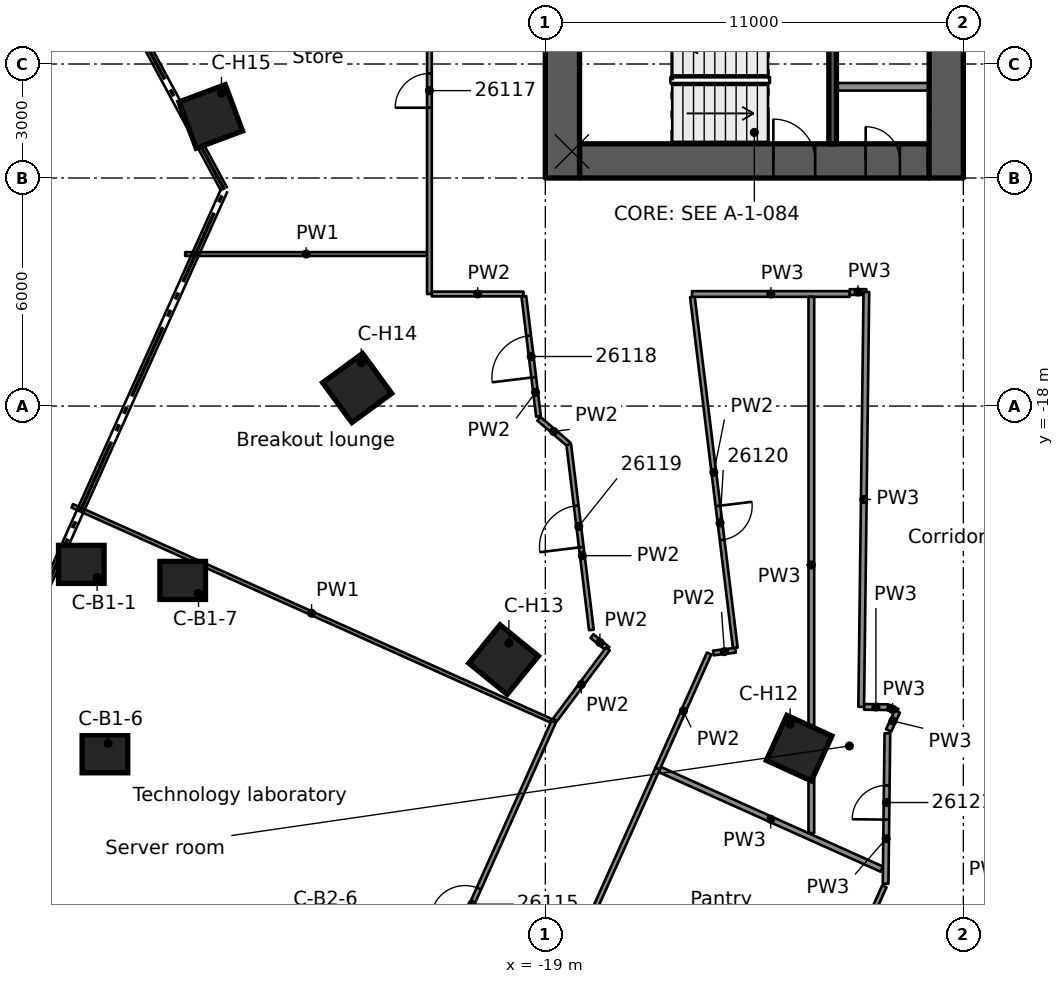
"""IFC4 building model, lengths in metres.
Left out: names, types, materials, properties, quantities, classifications, styles, units other than length and angle.
Written with IfcOpenShell. Run it as: python <this file> out.ifc"""

import sys

from ifc_helpers import new_model, si_unit, direction, frame, frame_2d, origin, origin_2d, place, context, subcontext, project, spatial, rectangle, extrude, element, fill, save


model = new_model("IFC4")
c1 = context("Model", 3, precision=1e-05, world=origin(), true_north=direction((0.0, 1.0)))
c2 = subcontext(c1, "Body", "Model", "MODEL_VIEW")
j1 = project(units=[si_unit("LENGTHUNIT", "METRE"), si_unit("PLANEANGLEUNIT", "RADIAN")], contexts=[c1])
p1 = place(None, origin())
s1 = spatial("IfcSite", under=j1, at=p1, CompositionType="ELEMENT")
p2 = place(p1, origin())
s2 = spatial("IfcBuilding", under=s1, at=p2, CompositionType="ELEMENT")
p3 = place(p2, frame((0.0, 0.0, 134.2)))
s3 = spatial("IfcBuildingStorey", under=s2, at=p3, CompositionType="ELEMENT", Elevation=134.2)
p4 = place(p3, frame((-18.1, -11.55, 0.0), z_axis=(0.0, 0.0, 1.0), x_axis=(1.0, 0.0, 0.0)))
e1 = element("IfcWall", 1, at=p4, inside=s3, PredefinedType="SHEAR", context=c2, shape_type="SweptSolid", body=[
    extrude(rectangle(XDim=9.2, YDim=0.9, at=frame_2d((4.6, 0.0))), origin(), (0.0, 0.0, 1.0), 3.5),
])
p5 = place(p4, frame((5.1, 0.0, 0.0)))
e2 = element("IfcOpeningElement", 2, at=p5, cuts=e1, PredefinedType="OPENING", context=c2, shape_type="SweptSolid", body=[
    extrude(rectangle(XDim=1.1, YDim=2.1, at=frame_2d((0.55, 1.05))), frame((0.0, 0.46, 0.0), z_axis=(0.0, -1.0, 0.0), x_axis=(1.0, 0.0, 0.0)), (0.0, 0.0, 1.0), 0.92),
])
p6 = place(p4, frame((7.53, 0.0, 0.0)))
e3 = element("IfcOpeningElement", 3, at=p6, cuts=e1, PredefinedType="OPENING", context=c2, shape_type="SweptSolid", body=[
    extrude(rectangle(XDim=0.9, YDim=2.1, at=frame_2d((0.45, 1.05))), frame((0.0, 0.46, 0.0), z_axis=(0.0, -1.0, 0.0), x_axis=(1.0, 0.0, 0.0)), (0.0, 0.0, 1.0), 0.92),
])
p7 = place(p3, frame((-18.55, -12.0, 0.0), z_axis=(0.0, 0.0, 1.0), x_axis=(0.0, 1.0, 0.0)))
e4 = element("IfcWall", 4, at=p7, inside=s3, PredefinedType="SHEAR", context=c2, shape_type="SweptSolid", body=[
    extrude(rectangle(XDim=24.0, YDim=0.9, at=frame_2d((12.0, 0.0))), origin(), (0.0, 0.0, 1.0), 3.5),
])
p8 = place(p7, frame((10.1, 0.0, 0.0)))
e5 = element("IfcOpeningElement", 5, at=p8, cuts=e4, PredefinedType="OPENING", context=c2, shape_type="SweptSolid", body=[
    extrude(rectangle(XDim=1.8, YDim=2.1, at=frame_2d((0.9, 1.05))), frame((0.0, 0.46, 0.0), z_axis=(0.0, -1.0, 0.0), x_axis=(1.0, 0.0, 0.0)), (0.0, 0.0, 1.0), 0.92),
])
p9 = place(p3, frame((-8.45, -12.0, 0.0), z_axis=(0.0, 0.0, 1.0), x_axis=(0.0, 1.0, 0.0)))
e6 = element("IfcWall", 6, at=p9, inside=s3, PredefinedType="SHEAR", context=c2, shape_type="SweptSolid", body=[
    extrude(rectangle(XDim=24.0, YDim=0.9, at=frame_2d((12.0, 0.0))), origin(), (0.0, 0.0, 1.0), 3.5),
])
p10 = place(p9, frame((9.6, 0.0, 0.0)))
e7 = element("IfcOpeningElement", 7, at=p10, cuts=e6, PredefinedType="OPENING", context=c2, shape_type="SweptSolid", body=[
    extrude(rectangle(XDim=1.8, YDim=2.1, at=frame_2d((0.9, 1.05))), frame((0.0, 0.46, 0.0), z_axis=(0.0, -1.0, 0.0), x_axis=(1.0, 0.0, 0.0)), (0.0, 0.0, 1.0), 0.92),
])
p11 = place(p9, frame((19.65, 0.0, 0.0)))
e8 = element("IfcOpeningElement", 8, at=p11, cuts=e6, PredefinedType="OPENING", context=c2, shape_type="SweptSolid", body=[
    extrude(rectangle(XDim=1.1, YDim=2.1, at=frame_2d((0.55, 1.05))), frame((0.0, 0.46, 0.0), z_axis=(0.0, -1.0, 0.0), x_axis=(1.0, 0.0, 0.0)), (0.0, 0.0, 1.0), 0.92),
])
for number, where, z_axis, x_axis in (
    (9, (-31.21, -22.166, 0.0), (0.0, 0.0, 1.0), (1.0, 0.0, 0.0)),
    (10, (-30.589, -27.15, 0.0), (0.0, 0.0, 1.0), (1.0, 0.0, 0.0)),
    (11, (-28.542, -22.588, 0.0), (0.0, 0.0, 1.0), (1.0, 0.0, 0.0)),
):
    element("IfcColumn", number, at=place(p3, frame(where, z_axis=z_axis, x_axis=x_axis)), inside=s3, PredefinedType="COLUMN", context=c2, shape_type="SweptSolid", body=[
        extrude(rectangle(XDim=1.2, YDim=1.0, at=origin_2d()), origin(), (0.0, 0.0, 1.0), 3.5),
    ])
for number, where, z_axis, x_axis in (
    (12, (-12.321, -27.001, 0.0), (0.0, 0.0, 1.0), (-0.415, -0.91, 0.0)),
    (13, (-20.098, -24.672, 0.0), (0.0, 0.0, 1.0), (-0.632, -0.775, 0.0)),
    (14, (-23.951, -17.526, 0.0), (0.0, 0.0, 1.0), (-0.807, -0.591, 0.0)),
    (15, (-27.804, -10.38, 0.0), (0.0, 0.0, 1.0), (-0.937, -0.35, 0.0)),
):
    element("IfcColumn", number, at=place(p3, frame(where, z_axis=z_axis, x_axis=x_axis)), inside=s3, PredefinedType="COLUMN", context=c2, shape_type="SweptSolid", body=[
        extrude(rectangle(XDim=1.3, YDim=1.3, at=origin_2d()), origin(), (0.0, 0.0, 1.0), 3.5),
    ])
p12 = place(p3, frame((-11.44, -11.1, 0.0), z_axis=(0.0, 0.0, 1.0), x_axis=(0.0, 1.0, 0.0)))
e16 = element("IfcWall", 16, at=p12, inside=s3, PredefinedType="SOLIDWALL", context=c2, shape_type="SweptSolid", body=[
    extrude(rectangle(XDim=4.125, YDim=0.2, at=frame_2d((2.062, 0.0))), origin(), (0.0, 0.0, 1.0), 3.09),
])
p13 = place(p3, frame((-8.9, -9.6, 0.0), z_axis=(0.0, 0.0, 1.0), x_axis=(-1.0, 0.0, 0.0)))
e17 = element("IfcWall", 17, at=p13, inside=s3, PredefinedType="PARTITIONING", context=c2, shape_type="SweptSolid", body=[
    extrude(rectangle(XDim=2.44, YDim=0.2, at=frame_2d((1.22, 0.0))), origin(), (0.0, 0.0, 1.0), 3.09),
])
p14 = place(p3, frame((-19.18, -18.272, 0.0), z_axis=(0.0, 0.0, 1.0), x_axis=(-0.120984312483, 0.992654419289, 0.0)))
e18 = element("IfcWall", 18, at=p14, inside=s3, PredefinedType="PARTITIONING", context=c2, shape_type="SweptSolid", body=[
    extrude(rectangle(XDim=3.182, YDim=0.125, at=frame_2d((1.591, 0.0))), origin(), (0.0, 0.0, 1.0), 3.03),
])
p15 = place(p14, frame((1.038, 0.0, 0.0)))
e19 = element("IfcOpeningElement", 19, at=p15, cuts=e18, PredefinedType="OPENING", context=c2, shape_type="SweptSolid", body=[
    extrude(rectangle(XDim=1.1, YDim=2.1, at=frame_2d((0.55, 1.05))), frame((0.0, 0.073, 0.0), z_axis=(0.0, -1.0, 0.0), x_axis=(1.0, 0.0, 0.0)), (0.0, 0.0, 1.0), 0.145),
])
p16 = place(p3, frame((-17.788, -23.891, 0.0), z_axis=(0.0, 0.0, 1.0), x_axis=(-0.121262962016, 0.992620417906, 0.0)))
e20 = element("IfcWall", 20, at=p16, inside=s3, PredefinedType="PARTITIONING", context=c2, shape_type="SweptSolid", body=[
    extrude(rectangle(XDim=4.923, YDim=0.125, at=frame_2d((2.461, 0.0))), origin(), (0.0, 0.0, 1.0), 3.03),
])
p17 = place(p16, frame((2.195, 0.0, 0.0)))
e21 = element("IfcOpeningElement", 21, at=p17, cuts=e20, PredefinedType="OPENING", context=c2, shape_type="SweptSolid", body=[
    extrude(rectangle(XDim=1.1, YDim=2.1, at=frame_2d((0.55, 1.05))), frame((0.0, 0.073, 0.0), z_axis=(0.0, -1.0, 0.0), x_axis=(1.0, 0.0, 0.0)), (0.0, 0.0, 1.0), 0.145),
])
p18 = place(p3, frame((-15.13, -15.125, 0.0), z_axis=(0.0, 0.0, 1.0), x_axis=(0.121299614281, -0.992615939614, 0.0)))
e22 = element("IfcWall", 22, at=p18, inside=s3, PredefinedType="PARTITIONING", context=c2, shape_type="SweptSolid", body=[
    extrude(rectangle(XDim=9.307, YDim=0.125, at=frame_2d((4.653, 0.0))), origin(), (0.0, 0.0, 1.0), 3.03),
])
p19 = place(p18, frame((5.544, 0.0, 0.0)))
e23 = element("IfcOpeningElement", 23, at=p19, cuts=e22, PredefinedType="OPENING", context=c2, shape_type="SweptSolid", body=[
    extrude(rectangle(XDim=0.9, YDim=2.1, at=frame_2d((0.45, 1.05))), frame((0.0, 0.073, 0.0), z_axis=(0.0, -1.0, 0.0), x_axis=(1.0, 0.0, 0.0)), (0.0, 0.0, 1.0), 0.145),
])
p20 = place(p3, frame((-17.772, -24.052, 0.0), z_axis=(0.0, 0.0, 1.0), x_axis=(0.774946890669, -0.632026357554, 0.0)))
e24 = element("IfcWall", 24, at=p20, inside=s3, PredefinedType="PARTITIONING", context=c2, shape_type="SweptSolid", body=[
    extrude(rectangle(XDim=0.538, YDim=0.125, at=frame_2d((0.269, 0.0))), origin(), (0.0, 0.0, 1.0), 3.03),
])
p21 = place(p3, frame((-9.988, -25.923, 0.0), z_axis=(0.0, 0.0, 1.0), x_axis=(0.909848474823, -0.414940661858, 0.0)))
e25 = element("IfcWall", 25, at=p21, inside=s3, PredefinedType="PARTITIONING", context=c2, shape_type="SweptSolid", body=[
    extrude(rectangle(XDim=0.275, YDim=0.15, at=frame_2d((0.137, 0.0))), origin(), (0.0, 0.0, 1.0), 3.03),
])
p22 = place(p3, frame((-35.67, -30.029, 0.0), z_axis=(0.0, 0.0, 1.0), x_axis=(0.912388382828, -0.409325590307, 0.0)))
e26 = element("IfcWall", 26, at=p22, inside=s3, PredefinedType="PARTITIONING", context=c2, shape_type="SweptSolid", body=[
    extrude(rectangle(XDim=13.827, YDim=0.1, at=frame_2d((6.914, 0.0))), origin(), (0.0, 0.0, 1.0), 3.03),
])
p23 = place(p3, frame((-31.45, -20.625, 0.0), z_axis=(0.0, 0.0, 1.0), x_axis=(0.91235405171, -0.409402105916, 0.0)))
e27 = element("IfcWall", 27, at=p23, inside=s3, PredefinedType="PARTITIONING", context=c2, shape_type="SweptSolid", body=[
    extrude(rectangle(XDim=13.808, YDim=0.1, at=frame_2d((6.904, 0.0))), origin(), (0.0, 0.0, 1.0), 3.03),
])
p24 = place(p3, frame((-15.988, -27.564, 0.0), z_axis=(0.0, 0.0, 1.0), x_axis=(0.912384094407, -0.409335149081, 0.0)))
e28 = element("IfcWall", 28, at=p24, inside=s3, PredefinedType="PARTITIONING", context=c2, shape_type="SweptSolid", body=[
    extrude(rectangle(XDim=6.401, YDim=0.15, at=frame_2d((3.2, 0.0))), origin(), (0.0, 0.0, 1.0), 3.03),
])
p25 = place(p3, frame((-10.613, -25.915, 0.0), z_axis=(0.0, 0.0, 1.0), x_axis=(0.999916926247, -0.012889554127, 0.0)))
e29 = element("IfcWall", 29, at=p25, inside=s3, PredefinedType="PARTITIONING", context=c2, shape_type="SweptSolid", body=[
    extrude(rectangle(XDim=0.625, YDim=0.15, at=frame_2d((0.312, 0.0))), origin(), (0.0, 0.0, 1.0), 3.03),
])
p26 = place(p3, frame((-21.988, -15.051, 0.0), z_axis=(0.0, 0.0, 1.0), x_axis=(1.0, 0.0, 0.0)))
e30 = element("IfcWall", 30, at=p26, inside=s3, PredefinedType="PARTITIONING", context=c2, shape_type="SweptSolid", body=[
    extrude(rectangle(XDim=2.415, YDim=0.125, at=frame_2d((1.208, 0.0))), origin(), (0.0, 0.0, 1.0), 3.03),
])
p27 = place(p3, frame((-15.139, -15.051, 0.0), z_axis=(0.0, 0.0, 1.0), x_axis=(1.0, 0.0, 0.0)))
e31 = element("IfcWall", 31, at=p27, inside=s3, PredefinedType="PARTITIONING", context=c2, shape_type="SweptSolid", body=[
    extrude(rectangle(XDim=4.148, YDim=0.15, at=frame_2d((2.074, 0.0))), origin(), (0.0, 0.0, 1.0), 3.03),
])
p28 = place(p3, frame((-28.477, -14.0, 0.0), z_axis=(0.0, 0.0, 1.0), x_axis=(1.0, 0.0, 0.0)))
e32 = element("IfcWall", 32, at=p28, inside=s3, PredefinedType="PARTITIONING", context=c2, shape_type="SweptSolid", body=[
    extrude(rectangle(XDim=6.364, YDim=0.1, at=frame_2d((3.182, 0.0))), origin(), (0.0, 0.0, 1.0), 3.03),
])
p29 = place(p3, frame((-10.99, -15.001, 0.0), z_axis=(0.0, 0.0, 1.0), x_axis=(0.99999751433, 0.002229648861, 0.0)))
e33 = element("IfcWall", 33, at=p29, inside=s3, PredefinedType="PARTITIONING", context=c2, shape_type="SweptSolid", body=[
    extrude(rectangle(XDim=0.438, YDim=0.15, at=frame_2d((0.219, 0.0))), origin(), (0.0, 0.0, 1.0), 3.03),
])
p30 = place(p3, frame((-14.579, -24.497, 0.0), z_axis=(0.0, 0.0, 1.0), x_axis=(0.992511783221, 0.122148926179, 0.0)))
e34 = element("IfcWall", 34, at=p30, inside=s3, PredefinedType="PARTITIONING", context=c2, shape_type="SweptSolid", body=[
    extrude(rectangle(XDim=0.59, YDim=0.125, at=frame_2d((0.295, 0.0))), origin(), (0.0, 0.0, 1.0), 3.03),
])
p31 = place(p3, frame((-19.171, -18.334, 0.0), z_axis=(0.0, 0.0, 1.0), x_axis=(0.760555965164, -0.649272380326, 0.0)))
e35 = element("IfcWall", 35, at=p31, inside=s3, PredefinedType="PARTITIONING", context=c2, shape_type="SweptSolid", body=[
    extrude(rectangle(XDim=1.033, YDim=0.125, at=frame_2d((0.517, 0.0))), origin(), (0.0, 0.0, 1.0), 3.03),
])
p32 = place(p3, frame((-17.355, -24.392, 0.0), z_axis=(0.0, 0.0, 1.0), x_axis=(-0.597497187646, -0.801871006306, 0.0)))
e36 = element("IfcWall", 36, at=p32, inside=s3, PredefinedType="PARTITIONING", context=c2, shape_type="SweptSolid", body=[
    extrude(rectangle(XDim=2.328, YDim=0.125, at=frame_2d((1.164, 0.0))), origin(), (0.0, 0.0, 1.0), 3.03),
])
p33 = place(p3, frame((-9.966, -26.535, 0.0), z_axis=(0.0, 0.0, 1.0), x_axis=(0.416455108449, 0.909156280651, 0.0)))
e37 = element("IfcWall", 37, at=p33, inside=s3, PredefinedType="PARTITIONING", context=c2, shape_type="SweptSolid", body=[
    extrude(rectangle(XDim=0.548, YDim=0.15, at=frame_2d((0.274, 0.0))), origin(), (0.0, 0.0, 1.0), 3.03),
])
p34 = place(p3, frame((-18.846, -50.182, 0.0), z_axis=(0.0, 0.0, 1.0), x_axis=(0.409280065355, 0.912408805363, 0.0)))
e38 = element("IfcWall", 38, at=p34, inside=s3, PredefinedType="PARTITIONING", context=c2, shape_type="SweptSolid", body=[
    extrude(rectangle(XDim=21.42, YDim=0.125, at=frame_2d((10.71, 0.0))), origin(), (0.0, 0.0, 1.0), 3.03),
])
p35 = place(p34, frame((16.1, 0.0, 0.0)))
e39 = element("IfcOpeningElement", 39, at=p35, cuts=e38, PredefinedType="OPENING", context=c2, shape_type="SweptSolid", body=[
    extrude(rectangle(XDim=0.9, YDim=2.1, at=frame_2d((0.45, 1.05))), frame((0.0, 0.073, 0.0), z_axis=(0.0, -1.0, 0.0), x_axis=(1.0, 0.0, 0.0)), (0.0, 0.0, 1.0), 0.145),
])
p36 = place(p34, frame((6.7, 0.0, 0.0)))
e40 = element("IfcOpeningElement", 40, at=p36, cuts=e38, PredefinedType="OPENING", context=c2, shape_type="SweptSolid", body=[
    extrude(rectangle(XDim=0.9, YDim=2.1, at=frame_2d((0.45, 1.05))), frame((0.0, 0.073, 0.0), z_axis=(0.0, -1.0, 0.0), x_axis=(1.0, 0.0, 0.0)), (0.0, 0.0, 1.0), 0.145),
])
p37 = place(p3, frame((-16.045, -27.538, 0.0), z_axis=(0.0, 0.0, 1.0), x_axis=(-0.408825080593, -0.912612762062, 0.0)))
e41 = element("IfcWall", 41, at=p37, inside=s3, PredefinedType="PARTITIONING", context=c2, shape_type="SweptSolid", body=[
    extrude(rectangle(XDim=21.806, YDim=0.125, at=frame_2d((10.903, 0.0))), origin(), (0.0, 0.0, 1.0), 3.03),
])
p38 = place(p37, frame((20.056, 0.0, 0.0)))
e42 = element("IfcOpeningElement", 42, at=p38, cuts=e41, PredefinedType="OPENING", context=c2, shape_type="SweptSolid", body=[
    extrude(rectangle(XDim=0.9, YDim=2.1, at=frame_2d((0.45, 1.05))), frame((0.0, 0.073, 0.0), z_axis=(0.0, -1.0, 0.0), x_axis=(1.0, 0.0, 0.0)), (0.0, 0.0, 1.0), 0.145),
])
p39 = place(p3, frame((-16.045, -27.538, 0.0), z_axis=(0.0, 0.0, 1.0), x_axis=(0.408690351199, 0.912673105135, 0.0)))
e43 = element("IfcWall", 43, at=p39, inside=s3, PredefinedType="PARTITIONING", context=c2, shape_type="SweptSolid", body=[
    extrude(rectangle(XDim=3.318, YDim=0.125, at=frame_2d((1.659, 0.0))), origin(), (0.0, 0.0, 1.0), 3.03),
])
p40 = place(p3, frame((-22.997, -35.715, 0.0), z_axis=(0.0, 0.0, 1.0), x_axis=(0.408864099405, 0.91259528172, 0.0)))
e44 = element("IfcWall", 44, at=p40, inside=s3, PredefinedType="PARTITIONING", context=c2, shape_type="SweptSolid", body=[
    extrude(rectangle(XDim=10.307, YDim=0.125, at=frame_2d((5.153, 0.0))), origin(), (0.0, 0.0, 1.0), 3.03),
])
p41 = place(p40, frame((4.6, 0.0, 0.0)))
e45 = element("IfcOpeningElement", 45, at=p41, cuts=e44, PredefinedType="OPENING", context=c2, shape_type="SweptSolid", body=[
    extrude(rectangle(XDim=0.9, YDim=2.1, at=frame_2d((0.45, 1.05))), frame((0.0, 0.073, 0.0), z_axis=(0.0, -1.0, 0.0), x_axis=(1.0, 0.0, 0.0)), (0.0, 0.0, 1.0), 0.145),
])
p42 = place(p3, frame((-10.046, -30.571, 0.0), z_axis=(0.0, 0.0, 1.0), x_axis=(0.011833490909, 0.999929981795, 0.0)))
e46 = element("IfcWall", 46, at=p42, inside=s3, PredefinedType="PARTITIONING", context=c2, shape_type="SweptSolid", body=[
    extrude(rectangle(XDim=3.961, YDim=0.15, at=frame_2d((1.98, 0.0))), origin(), (0.0, 0.0, 1.0), 3.03),
])
p43 = place(p42, frame((1.689, 0.0, 0.0)))
e47 = element("IfcOpeningElement", 47, at=p43, cuts=e46, PredefinedType="OPENING", context=c2, shape_type="SweptSolid", body=[
    extrude(rectangle(XDim=0.9, YDim=2.1, at=frame_2d((0.45, 1.05))), frame((0.0, 0.085, 0.0), z_axis=(0.0, -1.0, 0.0), x_axis=(1.0, 0.0, 0.0)), (0.0, 0.0, 1.0), 0.17),
])
p44 = place(p3, frame((-10.688, -25.914, 0.0), z_axis=(0.0, 0.0, 1.0), x_axis=(0.012457653597, 0.999922400423, 0.0)))
e48 = element("IfcWall", 48, at=p44, inside=s3, PredefinedType="PARTITIONING", context=c2, shape_type="SweptSolid", body=[
    extrude(rectangle(XDim=10.916, YDim=0.15, at=frame_2d((5.458, 0.0))), origin(), (0.0, 0.0, 1.0), 3.03),
])
p45 = place(p3, frame((-12.0, -29.237, 0.0), z_axis=(0.0, 0.0, 1.0), x_axis=(0.0, 1.0, 0.0)))
e49 = element("IfcWall", 49, at=p45, inside=s3, PredefinedType="PARTITIONING", context=c2, shape_type="SweptSolid", body=[
    extrude(rectangle(XDim=14.111, YDim=0.15, at=frame_2d((7.056, 0.0))), origin(), (0.0, 0.0, 1.0), 3.03),
])
p46 = place(p3, frame((-22.05, -15.051, 0.0), z_axis=(0.0, 0.0, 1.0), x_axis=(0.0, 1.0, 0.0)))
e50 = element("IfcWall", 50, at=p46, inside=s3, PredefinedType="PARTITIONING", context=c2, shape_type="SweptSolid", body=[
    extrude(rectangle(XDim=30.102, YDim=0.125, at=frame_2d((15.051, 0.0))), origin(), (0.0, 0.0, 1.0), 3.03),
])
p47 = place(p46, frame((4.901, 0.0, 0.0)))
e51 = element("IfcOpeningElement", 51, at=p47, cuts=e50, PredefinedType="OPENING", context=c2, shape_type="SweptSolid", body=[
    extrude(rectangle(XDim=0.9, YDim=2.1, at=frame_2d((0.45, 1.05))), frame((0.0, 0.073, 0.0), z_axis=(0.0, -1.0, 0.0), x_axis=(1.0, 0.0, 0.0)), (0.0, 0.0, 1.0), 0.145),
])
p48 = place(p46, frame((21.925, 0.0, 0.0)))
e52 = element("IfcOpeningElement", 52, at=p48, cuts=e50, PredefinedType="OPENING", context=c2, shape_type="SweptSolid", body=[
    extrude(rectangle(XDim=1.8, YDim=2.1, at=frame_2d((0.9, 1.05))), frame((0.0, 0.073, 0.0), z_axis=(0.0, -1.0, 0.0), x_axis=(1.0, 0.0, 0.0)), (0.0, 0.0, 1.0), 0.145),
])
p49 = place(p46, frame((11.926, 0.0, 0.0)))
e53 = element("IfcOpeningElement", 53, at=p49, cuts=e50, PredefinedType="OPENING", context=c2, shape_type="SweptSolid", body=[
    extrude(rectangle(XDim=1.1, YDim=2.1, at=frame_2d((0.55, 1.05))), frame((0.0, 0.073, 0.0), z_axis=(0.0, -1.0, 0.0), x_axis=(1.0, 0.0, 0.0)), (0.0, 0.0, 1.0), 0.145),
])
p50 = place(p5, origin())
e54 = element("IfcDoor", 54, at=p50, inside=s3, OperationType="SINGLE_SWING_RIGHT", PredefinedType="DOOR", context=c2, shape_type="SweptSolid", body=[
    extrude(rectangle(XDim=1.1, YDim=2.1, at=frame_2d((0.55, 1.05))), frame((0.0, 0.025, 0.0), z_axis=(0.0, -1.0, 0.0), x_axis=(1.0, 0.0, 0.0)), (0.0, 0.0, 1.0), 0.05),
])
fill(e2, e54)
p51 = place(p6, origin())
e55 = element("IfcDoor", 55, at=p51, inside=s3, OperationType="SINGLE_SWING_RIGHT", PredefinedType="DOOR", context=c2, shape_type="SweptSolid", body=[
    extrude(rectangle(XDim=0.9, YDim=2.1, at=frame_2d((0.45, 1.05))), frame((0.0, 0.025, 0.0), z_axis=(0.0, -1.0, 0.0), x_axis=(1.0, 0.0, 0.0)), (0.0, 0.0, 1.0), 0.05),
])
fill(e3, e55)
p52 = place(p41, origin())
e56 = element("IfcDoor", 56, at=p52, inside=s3, OperationType="SINGLE_SWING_LEFT", PredefinedType="DOOR", context=c2, shape_type="SweptSolid", body=[
    extrude(rectangle(XDim=0.9, YDim=2.1, at=frame_2d((0.45, 1.05))), frame((0.0, 0.025, 0.0), z_axis=(0.0, -1.0, 0.0), x_axis=(1.0, 0.0, 0.0)), (0.0, 0.0, 1.0), 0.05),
])
fill(e45, e56)
p53 = place(p47, origin())
e57 = element("IfcDoor", 57, at=p53, inside=s3, OperationType="SINGLE_SWING_LEFT", PredefinedType="DOOR", context=c2, shape_type="SweptSolid", body=[
    extrude(rectangle(XDim=0.9, YDim=2.1, at=frame_2d((0.45, 1.05))), frame((0.0, 0.025, 0.0), z_axis=(0.0, -1.0, 0.0), x_axis=(1.0, 0.0, 0.0)), (0.0, 0.0, 1.0), 0.05),
])
fill(e51, e57)
p54 = place(p15, origin())
e58 = element("IfcDoor", 58, at=p54, inside=s3, OperationType="SINGLE_SWING_LEFT", PredefinedType="DOOR", context=c2, shape_type="SweptSolid", body=[
    extrude(rectangle(XDim=1.1, YDim=2.1, at=frame_2d((0.55, 1.05))), frame((0.0, 0.025, 0.0), z_axis=(0.0, -1.0, 0.0), x_axis=(1.0, 0.0, 0.0)), (0.0, 0.0, 1.0), 0.05),
])
fill(e19, e58)
p55 = place(p17, origin())
e59 = element("IfcDoor", 59, at=p55, inside=s3, OperationType="SINGLE_SWING_RIGHT", PredefinedType="DOOR", context=c2, shape_type="SweptSolid", body=[
    extrude(rectangle(XDim=1.1, YDim=2.1, at=frame_2d((0.55, 1.05))), frame((0.0, 0.025, 0.0), z_axis=(0.0, -1.0, 0.0), x_axis=(1.0, 0.0, 0.0)), (0.0, 0.0, 1.0), 0.05),
])
fill(e21, e59)
p56 = place(p19, origin())
e60 = element("IfcDoor", 60, at=p56, inside=s3, OperationType="SINGLE_SWING_RIGHT", PredefinedType="DOOR", context=c2, shape_type="SweptSolid", body=[
    extrude(rectangle(XDim=0.9, YDim=2.1, at=frame_2d((0.45, 1.05))), frame((0.0, 0.025, 0.0), z_axis=(0.0, -1.0, 0.0), x_axis=(1.0, 0.0, 0.0)), (0.0, 0.0, 1.0), 0.05),
])
fill(e23, e60)
p57 = place(p43, origin())
e61 = element("IfcDoor", 61, at=p57, inside=s3, OperationType="SINGLE_SWING_RIGHT", PredefinedType="DOOR", context=c2, shape_type="SweptSolid", body=[
    extrude(rectangle(XDim=0.9, YDim=2.1, at=frame_2d((0.45, 1.05))), frame((0.0, 0.025, 0.0), z_axis=(0.0, -1.0, 0.0), x_axis=(1.0, 0.0, 0.0)), (0.0, 0.0, 1.0), 0.05),
])
fill(e47, e61)
save(model, sys.argv[1])
